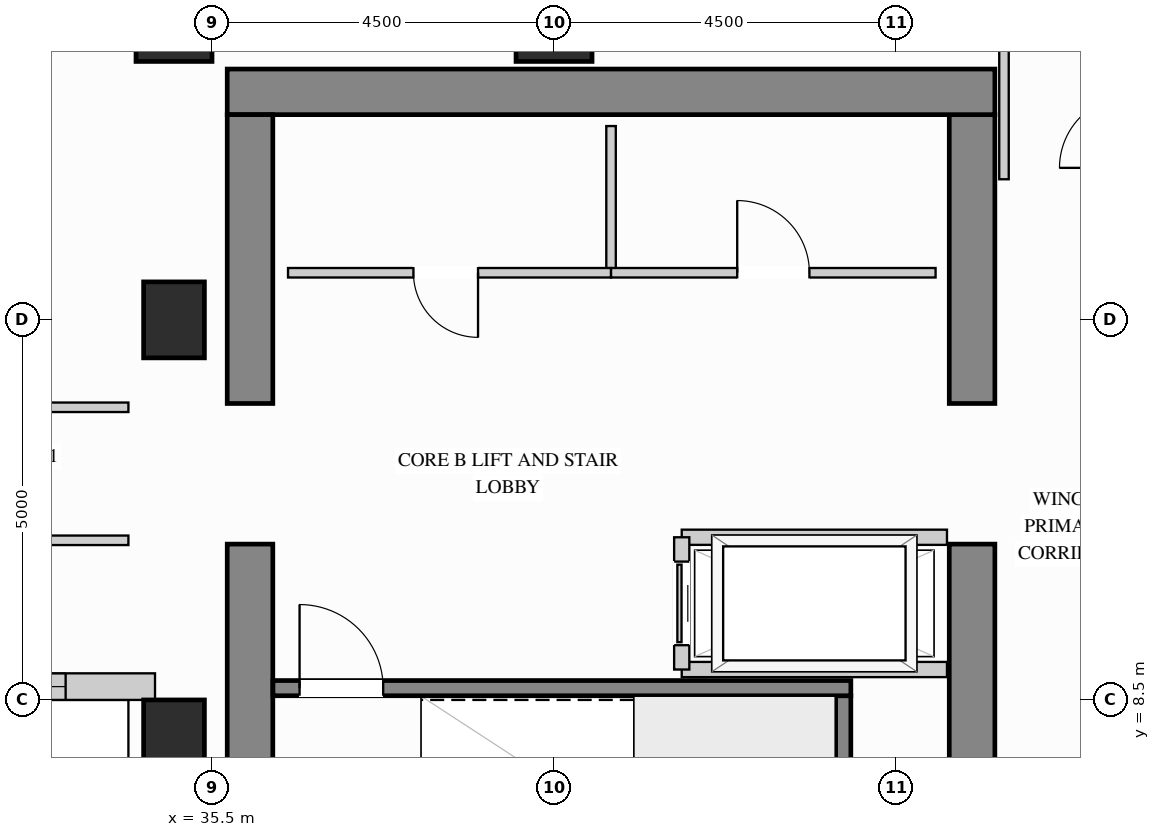
"""IFC4 building model, lengths in metres.
Left out: names, types, materials, properties, quantities, classifications, styles, units other than length and angle.
Written with IfcOpenShell. Run it as: python <this file> out.ifc"""

import sys

from ifc_helpers import new_model, si_unit, direction, frame, frame_2d, origin, origin_2d, place, context, subcontext, project, spatial, rectangle, extrude, source, transform, mapped, element, fill, save


model = new_model("IFC4")
c1 = context("Model", 3, precision=1e-05, world=origin(), true_north=direction((0.0, 1.0)))
c2 = subcontext(c1, "Body", "Model", "MODEL_VIEW")
j1 = project(units=[si_unit("LENGTHUNIT", "METRE"), si_unit("PLANEANGLEUNIT", "RADIAN")], contexts=[c1])
p1 = place(None, origin())
s1 = spatial("IfcSite", under=j1, at=p1, CompositionType="ELEMENT")
p2 = place(p1, origin())
s2 = spatial("IfcBuilding", under=s1, at=p2, CompositionType="ELEMENT")
p3 = place(p2, frame((0.0, 0.0, 204.3)))
s3 = spatial("IfcBuildingStorey", under=s2, at=p3, CompositionType="ELEMENT", Elevation=204.3)
m1 = source(origin(), c2, "Body", "SweptSolid", [
    extrude(rectangle(XDim=0.8, YDim=1.0, at=origin_2d()), origin(), (0.0, 0.0, 1.0), 3.32),
])
for number, where, z_axis, x_axis in (
    (1, (35.0, 13.5, 0.0), (0.0, 0.0, 1.0), (1.0, 0.0, 0.0)),
    (2, (35.0, 8.0, 0.0), (0.0, 0.0, 1.0), (1.0, 0.0, 0.0)),
):
    element("IfcColumn", number, at=place(p3, frame(where, z_axis=z_axis, x_axis=x_axis)), inside=s3, PredefinedType="COLUMN", context=c2, shape_type="MappedRepresentation", body=[
        mapped(m1, transform((0.0, 0.0, 0.0), x_axis=(1.0, 0.0, 0.0), y_axis=(0.0, 1.0, 0.0), z_axis=(0.0, 0.0, 1.0))),
    ])
m2 = source(origin(), c2, "Body", "SweptSolid", [
    extrude(rectangle(XDim=1.0, YDim=1.0, at=origin_2d()), origin(), (0.0, 0.0, 1.0), 3.32),
])
for number, where, z_axis, x_axis in (
    (3, (35.0, 17.4, 0.0), (0.0, 0.0, 1.0), (1.0, 0.0, 0.0)),
    (4, (40.0, 17.4, 0.0), (0.0, 0.0, 1.0), (1.0, 0.0, 0.0)),
):
    element("IfcColumn", number, at=place(p3, frame(where, z_axis=z_axis, x_axis=x_axis)), inside=s3, PredefinedType="COLUMN", context=c2, shape_type="MappedRepresentation", body=[
        mapped(m2, transform((0.0, 0.0, 0.0), x_axis=(1.0, 0.0, 0.0), y_axis=(0.0, 1.0, 0.0), z_axis=(0.0, 0.0, 1.0))),
    ])
m3 = source(origin(), c2, "Body", "SweptSolid", [
    extrude(rectangle(XDim=5.75, YDim=0.6, at=frame_2d((2.875, 0.0))), origin(), (0.0, 0.0, 1.0), 3.32),
])
p4 = place(p3, frame((45.5, 4.8, 0.0), z_axis=(0.0, 0.0, 1.0), x_axis=(0.0, 1.0, 0.0)))
e5 = element("IfcWall", 5, at=p4, inside=s3, PredefinedType="SHEAR", context=c2, shape_type="MappedRepresentation", body=[
    mapped(m3, transform((0.0, 0.0, 0.0), x_axis=(1.0, 0.0, 0.0), y_axis=(0.0, 1.0, 0.0), z_axis=(0.0, 0.0, 1.0))),
])
m4 = source(origin(), c2, "Body", "SweptSolid", [
    extrude(rectangle(XDim=3.8, YDim=0.6, at=frame_2d((1.9, 0.0))), origin(), (0.0, 0.0, 1.0), 3.32),
])
p5 = place(p3, frame((45.5, 12.4, 0.0), z_axis=(0.0, 0.0, 1.0), x_axis=(0.0, 1.0, 0.0)))
e6 = element("IfcWall", 6, at=p5, inside=s3, PredefinedType="SHEAR", context=c2, shape_type="MappedRepresentation", body=[
    mapped(m4, transform((0.0, 0.0, 0.0), x_axis=(1.0, 0.0, 0.0), y_axis=(0.0, 1.0, 0.0), z_axis=(0.0, 0.0, 1.0))),
])
m5 = source(origin(), c2, "Body", "SweptSolid", [
    extrude(rectangle(XDim=10.1, YDim=0.6, at=frame_2d((5.05, 0.0))), origin(), (0.0, 0.0, 1.0), 3.32),
])
p6 = place(p3, frame((35.7, 16.5, 0.0), z_axis=(0.0, 0.0, 1.0), x_axis=(1.0, 0.0, 0.0)))
e7 = element("IfcWall", 7, at=p6, inside=s3, PredefinedType="SHEAR", context=c2, shape_type="MappedRepresentation", body=[
    mapped(m5, transform((0.0, 0.0, 0.0), x_axis=(1.0, 0.0, 0.0), y_axis=(0.0, 1.0, 0.0), z_axis=(0.0, 0.0, 1.0))),
])
p7 = place(p3, frame((36.0, 4.8, 0.0), z_axis=(0.0, 0.0, 1.0), x_axis=(0.0, 1.0, 0.0)))
e8 = element("IfcWall", 8, at=p7, inside=s3, PredefinedType="SHEAR", context=c2, shape_type="MappedRepresentation", body=[
    mapped(m3, transform((0.0, 0.0, 0.0), x_axis=(1.0, 0.0, 0.0), y_axis=(0.0, 1.0, 0.0), z_axis=(0.0, 0.0, 1.0))),
])
p8 = place(p3, frame((36.0, 12.4, 0.0), z_axis=(0.0, 0.0, 1.0), x_axis=(0.0, 1.0, 0.0)))
e9 = element("IfcWall", 9, at=p8, inside=s3, PredefinedType="SHEAR", context=c2, shape_type="MappedRepresentation", body=[
    mapped(m4, transform((0.0, 0.0, 0.0), x_axis=(1.0, 0.0, 0.0), y_axis=(0.0, 1.0, 0.0), z_axis=(0.0, 0.0, 1.0))),
])
p9 = place(p3, frame((30.898, 8.675, 0.0), z_axis=(0.0, 0.0, 1.0), x_axis=(1.0, 0.0, 0.0)))
e10 = element("IfcWall", 10, at=p9, inside=s3, PredefinedType="SOLIDWALL", context=c2, shape_type="SweptSolid", body=[
    extrude(rectangle(XDim=3.852, YDim=0.35, at=frame_2d((1.926, 0.0))), origin(), (0.0, 0.0, 1.0), 3.305),
])
p10 = place(p9, frame((1.176, 0.0, 0.78)))
e11 = element("IfcOpeningElement", 11, at=p10, cuts=e10, PredefinedType="OPENING", context=c2, shape_type="SweptSolid", body=[
    extrude(rectangle(XDim=1.5, YDim=2.0, at=frame_2d((0.75, 1.0))), frame((0.0, 0.185, 0.0), z_axis=(0.0, -1.0, 0.0), x_axis=(1.0, 0.0, 0.0)), (0.0, 0.0, 1.0), 0.37),
])
m6 = source(origin(), c2, "Body", "SweptSolid", [
    extrude(rectangle(XDim=1.93, YDim=0.125, at=frame_2d((0.965, 0.0))), origin(), (0.0, 0.0, 1.0), 3.305),
])
p11 = place(p3, frame((40.75, 14.12, 0.0), z_axis=(0.0, 0.0, 1.0), x_axis=(0.0, 1.0, 0.0)))
e12 = element("IfcWall", 12, at=p11, inside=s3, PredefinedType="PARTITIONING", context=c2, shape_type="MappedRepresentation", body=[
    mapped(m6, transform((0.0, 0.0, 0.0), x_axis=(1.0, 0.0, 0.0), y_axis=(0.0, 1.0, 0.0), z_axis=(0.0, 0.0, 1.0))),
])
p12 = place(p3, frame((36.5, 14.12, 0.0), z_axis=(0.0, 0.0, 1.0), x_axis=(1.0, 0.0, 0.0)))
e13 = element("IfcWall", 13, at=p12, inside=s3, PredefinedType="PARTITIONING", context=c2, shape_type="SweptSolid", body=[
    extrude(rectangle(XDim=4.25, YDim=0.125, at=frame_2d((2.125, 0.0))), origin(), (0.0, 0.0, 1.0), 3.305),
])
p13 = place(p12, frame((1.65, 0.0, 0.0)))
e14 = element("IfcOpeningElement", 14, at=p13, cuts=e13, PredefinedType="OPENING", context=c2, shape_type="SweptSolid", body=[
    extrude(rectangle(XDim=0.85, YDim=2.1, at=frame_2d((0.425, 1.05))), frame((0.0, 0.073, 0.0), z_axis=(0.0, -1.0, 0.0), x_axis=(1.0, 0.0, 0.0)), (0.0, 0.0, 1.0), 0.145),
])
p14 = place(p3, frame((40.75, 14.12, 0.0), z_axis=(0.0, 0.0, 1.0), x_axis=(1.0, 0.0, 0.0)))
e15 = element("IfcWall", 15, at=p14, inside=s3, PredefinedType="PARTITIONING", context=c2, shape_type="SweptSolid", body=[
    extrude(rectangle(XDim=4.27, YDim=0.125, at=frame_2d((2.135, 0.0))), origin(), (0.0, 0.0, 1.0), 3.305),
])
p15 = place(p14, frame((1.66, 0.0, 0.0)))
e16 = element("IfcOpeningElement", 16, at=p15, cuts=e15, PredefinedType="OPENING", context=c2, shape_type="SweptSolid", body=[
    extrude(rectangle(XDim=0.95, YDim=2.15, at=frame_2d((0.475, 1.075))), frame((0.0, 0.073, 0.0), z_axis=(0.0, -1.0, 0.0), x_axis=(1.0, 0.0, 0.0)), (0.0, 0.0, 1.0), 0.145),
])
m7 = source(origin(), c2, "Body", "SweptSolid", [
    extrude(rectangle(XDim=2.298, YDim=0.125, at=frame_2d((1.149, 0.0))), origin(), (0.0, 0.0, 1.0), 3.305),
])
p16 = place(p3, frame((45.92, 15.35, 0.0), z_axis=(0.0, 0.0, 1.0), x_axis=(0.0, 1.0, 0.0)))
e17 = element("IfcWall", 17, at=p16, inside=s3, PredefinedType="PARTITIONING", context=c2, shape_type="MappedRepresentation", body=[
    mapped(m7, transform((0.0, 0.0, 0.0), x_axis=(1.0, 0.0, 0.0), y_axis=(0.0, 1.0, 0.0), z_axis=(0.0, 0.0, 1.0))),
])
p17 = place(p3, frame((29.85, 12.35, 0.0), z_axis=(0.0, 0.0, 1.0), x_axis=(1.0, 0.0, 0.0)))
e18 = element("IfcWall", 18, at=p17, inside=s3, PredefinedType="PARTITIONING", context=c2, shape_type="SweptSolid", body=[
    extrude(rectangle(XDim=4.55, YDim=0.125, at=frame_2d((2.275, 0.0))), origin(), (0.0, 0.0, 1.0), 3.305),
])
p18 = place(p17, frame((1.8, 0.0, 0.0)))
e19 = element("IfcOpeningElement", 19, at=p18, cuts=e18, PredefinedType="OPENING", context=c2, shape_type="SweptSolid", body=[
    extrude(rectangle(XDim=0.95, YDim=2.15, at=frame_2d((0.475, 1.075))), frame((0.0, 0.073, 0.0), z_axis=(0.0, -1.0, 0.0), x_axis=(1.0, 0.0, 0.0)), (0.0, 0.0, 1.0), 0.145),
])
p19 = place(p3, frame((29.85, 10.6, 0.0), z_axis=(0.0, 0.0, 1.0), x_axis=(1.0, 0.0, 0.0)))
e20 = element("IfcWall", 20, at=p19, inside=s3, PredefinedType="PARTITIONING", context=c2, shape_type="SweptSolid", body=[
    extrude(rectangle(XDim=4.55, YDim=0.125, at=frame_2d((2.275, 0.0))), origin(), (0.0, 0.0, 1.0), 3.305),
])
p20 = place(p19, frame((1.8, 0.0, 0.0)))
e21 = element("IfcOpeningElement", 21, at=p20, cuts=e20, PredefinedType="OPENING", context=c2, shape_type="SweptSolid", body=[
    extrude(rectangle(XDim=0.95, YDim=2.15, at=frame_2d((0.475, 1.075))), frame((0.0, 0.073, 0.0), z_axis=(0.0, -1.0, 0.0), x_axis=(1.0, 0.0, 0.0)), (0.0, 0.0, 1.0), 0.145),
])
m8 = source(origin(), c2, "Body", "SweptSolid", [
    extrude(rectangle(XDim=3.49, YDim=0.2, at=frame_2d((1.745, 0.0))), origin(), (0.0, 0.0, 1.0), 3.305),
])
for number, where, z_axis, x_axis in (
    (22, (41.68, 10.64, 0.0), (0.0, 0.0, 1.0), (1.0, 0.0, 0.0)),
    (23, (41.68, 8.9, 0.0), (0.0, 0.0, 1.0), (1.0, 0.0, 0.0)),
):
    element("IfcWall", number, at=place(p3, frame(where, z_axis=z_axis, x_axis=x_axis)), inside=s3, PredefinedType="PARTITIONING", context=c2, shape_type="MappedRepresentation", body=[
        mapped(m8, transform((0.0, 0.0, 0.0), x_axis=(1.0, 0.0, 0.0), y_axis=(0.0, 1.0, 0.0), z_axis=(0.0, 0.0, 1.0))),
    ])
p21 = place(p3, frame((41.68, 8.9, 0.0), z_axis=(0.0, 0.0, 1.0), x_axis=(0.0, 1.0, 0.0)))
e24 = element("IfcWall", 24, at=p21, inside=s3, PredefinedType="PARTITIONING", context=c2, shape_type="SweptSolid", body=[
    extrude(rectangle(XDim=1.74, YDim=0.2, at=frame_2d((0.87, 0.0))), origin(), (0.0, 0.0, 1.0), 3.305),
])
p22 = place(p21, frame((0.32, 0.0, 0.0)))
e25 = element("IfcOpeningElement", 25, at=p22, cuts=e24, PredefinedType="OPENING", context=c2, shape_type="SweptSolid", body=[
    extrude(rectangle(XDim=1.1, YDim=2.2, at=frame_2d((0.55, 1.1))), frame((0.0, 0.11, 0.0), z_axis=(0.0, -1.0, 0.0), x_axis=(1.0, 0.0, 0.0)), (0.0, 0.0, 1.0), 0.22),
])
m9 = source(origin(), c2, "Body", "SweptSolid", [
    extrude(rectangle(XDim=3.753, YDim=0.2, at=frame_2d((1.876, 0.0))), origin(), (0.0, 0.0, 1.0), 3.32),
])
p23 = place(p3, frame((43.805, 4.802, 0.0), z_axis=(0.0, 0.0, 1.0), x_axis=(0.0, 1.0, 0.0)))
e26 = element("IfcWall", 26, at=p23, inside=s3, PredefinedType="SHEAR", context=c2, shape_type="MappedRepresentation", body=[
    mapped(m9, transform((0.0, 0.0, 0.0), x_axis=(1.0, 0.0, 0.0), y_axis=(0.0, 1.0, 0.0), z_axis=(0.0, 0.0, 1.0))),
])
p24 = place(p3, frame((36.302, 8.655, 0.0), z_axis=(0.0, 0.0, 1.0), x_axis=(1.0, 0.0, 0.0)))
e27 = element("IfcWall", 27, at=p24, inside=s3, PredefinedType="SHEAR", context=c2, shape_type="SweptSolid", body=[
    extrude(rectangle(XDim=7.603, YDim=0.2, at=frame_2d((3.802, 0.0))), origin(), (0.0, 0.0, 1.0), 3.32),
])
p25 = place(p24, frame((0.35, 0.0, 0.0)))
e28 = element("IfcOpeningElement", 28, at=p25, cuts=e27, PredefinedType="OPENING", context=c2, shape_type="SweptSolid", body=[
    extrude(rectangle(XDim=1.1, YDim=2.15, at=frame_2d((0.55, 1.075))), frame((0.0, 0.11, 0.0), z_axis=(0.0, -1.0, 0.0), x_axis=(1.0, 0.0, 0.0)), (0.0, 0.0, 1.0), 0.22),
])
m10 = source(origin(), c2, "Body", "SweptSolid", [
    extrude(rectangle(XDim=1.1, YDim=2.2, at=frame_2d((0.55, 1.1))), frame((0.0, 0.025, 0.0), z_axis=(0.0, -1.0, 0.0), x_axis=(1.0, 0.0, 0.0)), (0.0, 0.0, 1.0), 0.05),
])
p26 = place(p22, origin())
e29 = element("IfcDoor", 29, at=p26, inside=s3, OperationType="SLIDING_TO_LEFT", PredefinedType="DOOR", context=c2, shape_type="MappedRepresentation", body=[
    mapped(m10, transform((0.0, 0.0, 0.0), x_axis=(1.0, 0.0, 0.0), y_axis=(0.0, 1.0, 0.0), z_axis=(0.0, 0.0, 1.0))),
])
fill(e25, e29)
m11 = source(origin(), c2, "Body", "SweptSolid", [
    extrude(rectangle(XDim=0.95, YDim=2.15, at=frame_2d((0.475, 1.075))), frame((0.0, 0.025, 0.0), z_axis=(0.0, -1.0, 0.0), x_axis=(1.0, 0.0, 0.0)), (0.0, 0.0, 1.0), 0.05),
])
p27 = place(p15, origin())
e30 = element("IfcDoor", 30, at=p27, inside=s3, OperationType="SINGLE_SWING_LEFT", PredefinedType="DOOR", context=c2, shape_type="MappedRepresentation", body=[
    mapped(m11, transform((0.0, 0.0, 0.0), x_axis=(1.0, 0.0, 0.0), y_axis=(0.0, 1.0, 0.0), z_axis=(0.0, 0.0, 1.0))),
])
fill(e16, e30)
m12 = source(origin(), c2, "Body", "SweptSolid", [
    extrude(rectangle(XDim=0.85, YDim=2.1, at=frame_2d((0.425, 1.05))), frame((0.0, 0.025, 0.0), z_axis=(0.0, -1.0, 0.0), x_axis=(1.0, 0.0, 0.0)), (0.0, 0.0, 1.0), 0.05),
])
p28 = place(p13, origin())
e31 = element("IfcDoor", 31, at=p28, inside=s3, OperationType="SINGLE_SWING_RIGHT", PredefinedType="DOOR", context=c2, shape_type="MappedRepresentation", body=[
    mapped(m12, transform((0.0, 0.0, 0.0), x_axis=(1.0, 0.0, 0.0), y_axis=(0.0, 1.0, 0.0), z_axis=(0.0, 0.0, 1.0))),
])
fill(e14, e31)
m13 = source(origin(), c2, "Body", "SweptSolid", [
    extrude(rectangle(XDim=1.1, YDim=2.15, at=frame_2d((0.55, 1.075))), frame((0.0, 0.025, 0.0), z_axis=(0.0, -1.0, 0.0), x_axis=(1.0, 0.0, 0.0)), (0.0, 0.0, 1.0), 0.05),
])
p29 = place(p25, origin())
e32 = element("IfcDoor", 32, at=p29, inside=s3, OperationType="SINGLE_SWING_LEFT", PredefinedType="DOOR", context=c2, shape_type="MappedRepresentation", body=[
    mapped(m13, transform((0.0, 0.0, 0.0), x_axis=(1.0, 0.0, 0.0), y_axis=(0.0, 1.0, 0.0), z_axis=(0.0, 0.0, 1.0))),
])
fill(e28, e32)
m14 = source(origin(), c2, "Body", "SweptSolid", [
    extrude(rectangle(XDim=1.5, YDim=2.0, at=frame_2d((0.75, 1.0))), frame((0.0, 0.03, 0.0), z_axis=(0.0, -1.0, 0.0), x_axis=(1.0, 0.0, 0.0)), (0.0, 0.0, 1.0), 0.06),
])
p30 = place(p10, origin())
e33 = element("IfcWindow", 33, at=p30, inside=s3, PartitioningType="SINGLE_PANEL", PredefinedType="WINDOW", context=c2, shape_type="MappedRepresentation", body=[
    mapped(m14, transform((0.0, 0.0, 0.0), x_axis=(1.0, 0.0, 0.0), y_axis=(0.0, 1.0, 0.0), z_axis=(0.0, 0.0, 1.0))),
])
fill(e11, e33)
save(model, sys.argv[1])
